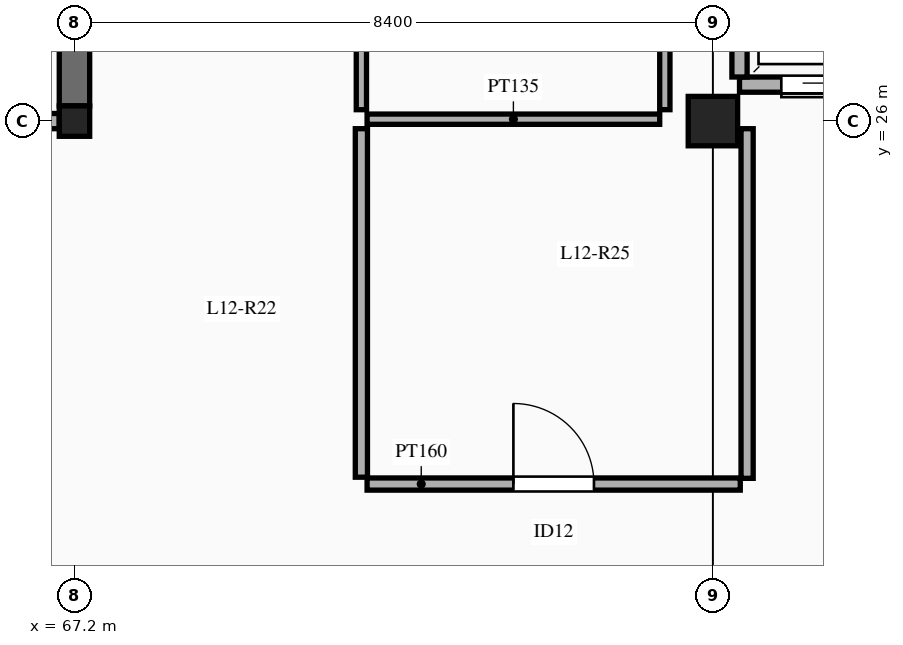
"""IFC4 building model, lengths in metres.
Left out: names, types, materials, properties, quantities, classifications, styles, units other than length and angle.
Written with IfcOpenShell. Run it as: python <this file> out.ifc"""

import sys

from ifc_helpers import new_model, si_unit, direction, frame, frame_2d, origin, origin_2d, place, context, subcontext, project, spatial, rectangle, extrude, element, fill, save


model = new_model("IFC4")
c1 = context("Model", 3, precision=1e-05, world=origin(), true_north=direction((0.0, 1.0)))
c2 = subcontext(c1, "Body", "Model", "MODEL_VIEW")
j1 = project(units=[si_unit("LENGTHUNIT", "METRE"), si_unit("PLANEANGLEUNIT", "RADIAN")], contexts=[c1])
p1 = place(None, origin())
s1 = spatial("IfcSite", under=j1, at=p1, CompositionType="ELEMENT")
p2 = place(p1, origin())
s2 = spatial("IfcBuilding", under=s1, at=p2, CompositionType="ELEMENT")
p3 = place(p2, frame((0.0, 0.0, 55.5)))
s3 = spatial("IfcBuildingStorey", under=s2, at=p3, CompositionType="ELEMENT", Elevation=55.5)
p4 = place(p3, frame((67.2, 26.0, 0.0), z_axis=(0.0, 0.0, 1.0), x_axis=(1.0, 0.0, 0.0)))
e1 = element("IfcColumn", 1, at=p4, inside=s3, PredefinedType="COLUMN", context=c2, shape_type="SweptSolid", body=[
    extrude(rectangle(XDim=0.4, YDim=0.4, at=origin_2d()), origin(), (0.0, 0.0, 1.0), 4.5),
])
p5 = place(p3, frame((75.6, 26.0, 0.0), z_axis=(0.0, 0.0, 1.0), x_axis=(1.0, 0.0, 0.0)))
e2 = element("IfcColumn", 2, at=p5, inside=s3, PredefinedType="COLUMN", context=c2, shape_type="SweptSolid", body=[
    extrude(rectangle(XDim=0.65, YDim=0.65, at=origin_2d()), origin(), (0.0, 0.0, 1.0), 4.5),
])
p6 = place(p3, frame((67.2, 26.2, 0.0), z_axis=(0.0, 0.0, 1.0), x_axis=(0.0, 1.0, 0.0)))
e3 = element("IfcWall", 3, at=p6, inside=s3, PredefinedType="SHEAR", context=c2, shape_type="SweptSolid", body=[
    extrude(rectangle(XDim=8.0, YDim=0.4, at=frame_2d((4.0, 0.0))), origin(), (0.0, 0.0, 1.0), 4.5),
])
p7 = place(p3, frame((59.0, 26.0, 0.0), z_axis=(0.0, 0.0, 1.0), x_axis=(1.0, 0.0, 0.0)))
e4 = element("IfcWall", 4, at=p7, inside=s3, PredefinedType="SOLIDWALL", context=c2, shape_type="SweptSolid", body=[
    extrude(rectangle(XDim=8.0, YDim=0.2, at=frame_2d((4.0, 0.0))), origin(), (0.0, 0.0, 1.0), 3.83),
])
p8 = place(p7, frame((1.55, 0.0, 0.0)))
e5 = element("IfcOpeningElement", 5, at=p8, cuts=e4, PredefinedType="OPENING", context=c2, shape_type="SweptSolid", body=[
    extrude(rectangle(XDim=1.15, YDim=2.15, at=frame_2d((0.575, 1.075))), frame((0.0, 0.11, 0.0), z_axis=(0.0, -1.0, 0.0), x_axis=(1.0, 0.0, 0.0)), (0.0, 0.0, 1.0), 0.22),
])
p9 = place(p7, frame((5.35, 0.0, 0.0)))
e6 = element("IfcOpeningElement", 6, at=p9, cuts=e4, PredefinedType="OPENING", context=c2, shape_type="SweptSolid", body=[
    extrude(rectangle(XDim=1.22, YDim=2.15, at=frame_2d((0.61, 1.075))), frame((0.0, 0.11, 0.0), z_axis=(0.0, -1.0, 0.0), x_axis=(1.0, 0.0, 0.0)), (0.0, 0.0, 1.0), 0.22),
])
p10 = place(p3, frame((75.95, 26.48, 0.0), z_axis=(0.0, 0.0, 1.0), x_axis=(1.0, 0.0, 0.0)))
e7 = element("IfcWall", 7, at=p10, inside=s3, PredefinedType="SOLIDWALL", context=c2, shape_type="SweptSolid", body=[
    extrude(rectangle(XDim=7.77, YDim=0.2, at=frame_2d((3.885, 0.0))), origin(), (0.0, 0.0, 1.0), 4.3),
])
p11 = place(p10, frame((0.55, 0.0, 0.0)))
e8 = element("IfcOpeningElement", 8, at=p11, cuts=e7, PredefinedType="OPENING", context=c2, shape_type="SweptSolid", body=[
    extrude(rectangle(XDim=1.0, YDim=2.15, at=frame_2d((0.5, 1.075))), frame((0.0, 0.11, 0.0), z_axis=(0.0, -1.0, 0.0), x_axis=(1.0, 0.0, 0.0)), (0.0, 0.0, 1.0), 0.22),
])
p12 = place(p10, frame((3.35, 0.0, 0.0)))
e9 = element("IfcOpeningElement", 9, at=p12, cuts=e7, PredefinedType="OPENING", context=c2, shape_type="SweptSolid", body=[
    extrude(rectangle(XDim=1.0, YDim=2.15, at=frame_2d((0.5, 1.075))), frame((0.0, 0.11, 0.0), z_axis=(0.0, -1.0, 0.0), x_axis=(1.0, 0.0, 0.0)), (0.0, 0.0, 1.0), 0.22),
])
p13 = place(p10, frame((6.15, 0.0, 0.0)))
e10 = element("IfcOpeningElement", 10, at=p13, cuts=e7, PredefinedType="OPENING", context=c2, shape_type="SweptSolid", body=[
    extrude(rectangle(XDim=1.0, YDim=2.15, at=frame_2d((0.5, 1.075))), frame((0.0, 0.11, 0.0), z_axis=(0.0, -1.0, 0.0), x_axis=(1.0, 0.0, 0.0)), (0.0, 0.0, 1.0), 0.22),
])
p14 = place(p3, frame((75.95, 26.58, 0.0), z_axis=(0.0, 0.0, 1.0), x_axis=(0.0, 1.0, 0.0)))
e11 = element("IfcWall", 11, at=p14, inside=s3, PredefinedType="SOLIDWALL", context=c2, shape_type="SweptSolid", body=[
    extrude(rectangle(XDim=1.84, YDim=0.2, at=frame_2d((0.92, 0.0))), origin(), (0.0, 0.0, 1.0), 4.3),
])
p15 = place(p3, frame((70.975, 26.15, 0.0), z_axis=(0.0, 0.0, 1.0), x_axis=(0.0, 1.0, 0.0)))
e12 = element("IfcWall", 12, at=p15, inside=s3, PredefinedType="PARTITIONING", context=c2, shape_type="SweptSolid", body=[
    extrude(rectangle(XDim=3.95, YDim=0.135, at=frame_2d((1.975, 0.0))), origin(), (0.0, 0.0, 1.0), 3.45),
])
p16 = place(p15, frame((1.441, 0.0, 0.0)))
e13 = element("IfcOpeningElement", 13, at=p16, cuts=e12, PredefinedType="OPENING", context=c2, shape_type="SweptSolid", body=[
    extrude(rectangle(XDim=0.92, YDim=2.12, at=frame_2d((0.46, 1.06))), frame((0.0, 0.077, 0.0), z_axis=(0.0, -1.0, 0.0), x_axis=(1.0, 0.0, 0.0)), (0.0, 0.0, 1.0), 0.155),
])
p17 = place(p3, frame((71.05, 26.025, 0.0), z_axis=(0.0, 0.0, 1.0), x_axis=(1.0, 0.0, 0.0)))
e14 = element("IfcWall", 14, at=p17, inside=s3, PredefinedType="PARTITIONING", context=c2, shape_type="SweptSolid", body=[
    extrude(rectangle(XDim=3.85, YDim=0.135, at=frame_2d((1.925, 0.0))), origin(), (0.0, 0.0, 1.0), 3.45),
])
p18 = place(p3, frame((76.05, 21.3, 0.0), z_axis=(0.0, 0.0, 1.0), x_axis=(0.0, 1.0, 0.0)))
e15 = element("IfcWall", 15, at=p18, inside=s3, PredefinedType="PARTITIONING", context=c2, shape_type="SweptSolid", body=[
    extrude(rectangle(XDim=4.6, YDim=0.16, at=frame_2d((2.3, 0.0))), origin(), (0.0, 0.0, 1.0), 3.45),
])
p19 = place(p3, frame((71.05, 21.225, 0.0), z_axis=(0.0, 0.0, 1.0), x_axis=(1.0, 0.0, 0.0)))
e16 = element("IfcWall", 16, at=p19, inside=s3, PredefinedType="PARTITIONING", context=c2, shape_type="SweptSolid", body=[
    extrude(rectangle(XDim=4.91, YDim=0.16, at=frame_2d((2.455, 0.0))), origin(), (0.0, 0.0, 1.0), 3.45),
])
p20 = place(p19, frame((1.925, 0.0, 0.0)))
e17 = element("IfcOpeningElement", 17, at=p20, cuts=e16, PredefinedType="OPENING", context=c2, shape_type="SweptSolid", body=[
    extrude(rectangle(XDim=1.06, YDim=2.18, at=frame_2d((0.53, 1.09))), frame((0.0, 0.09, 0.0), z_axis=(0.0, -1.0, 0.0), x_axis=(1.0, 0.0, 0.0)), (0.0, 0.0, 1.0), 0.18),
])
p21 = place(p3, frame((70.975, 21.315, 0.0), z_axis=(0.0, 0.0, 1.0), x_axis=(0.0, 1.0, 0.0)))
e18 = element("IfcWall", 18, at=p21, inside=s3, PredefinedType="PARTITIONING", context=c2, shape_type="SweptSolid", body=[
    extrude(rectangle(XDim=4.585, YDim=0.16, at=frame_2d((2.292, 0.0))), origin(), (0.0, 0.0, 1.0), 3.45),
])
p22 = place(p3, frame((74.968, 26.15, 0.0), z_axis=(0.0, 0.0, 1.0), x_axis=(0.0, 1.0, 0.0)))
e19 = element("IfcWall", 19, at=p22, inside=s3, PredefinedType="PARTITIONING", context=c2, shape_type="SweptSolid", body=[
    extrude(rectangle(XDim=3.948, YDim=0.135, at=frame_2d((1.974, 0.0))), origin(), (0.0, 0.0, 1.0), 3.45),
])
p23 = place(p11, frame((1.0, 0.0, 0.0), z_axis=(0.0, 0.0, 1.0), x_axis=(-1.0, 0.0, 0.0)))
e20 = element("IfcDoor", 20, at=p23, inside=s3, OperationType="SLIDING_TO_LEFT", PredefinedType="DOOR", context=c2, shape_type="SweptSolid", body=[
    extrude(rectangle(XDim=1.0, YDim=2.15, at=frame_2d((0.5, 1.075))), frame((0.0, 0.025, 0.0), z_axis=(0.0, -1.0, 0.0), x_axis=(1.0, 0.0, 0.0)), (0.0, 0.0, 1.0), 0.05),
])
fill(e8, e20)
p24 = place(p20, origin())
e21 = element("IfcDoor", 21, at=p24, inside=s3, OperationType="SINGLE_SWING_LEFT", PredefinedType="DOOR", context=c2, shape_type="SweptSolid", body=[
    extrude(rectangle(XDim=1.06, YDim=2.18, at=frame_2d((0.53, 1.09))), frame((0.0, 0.025, 0.0), z_axis=(0.0, -1.0, 0.0), x_axis=(1.0, 0.0, 0.0)), (0.0, 0.0, 1.0), 0.05),
])
fill(e17, e21)
save(model, sys.argv[1])
